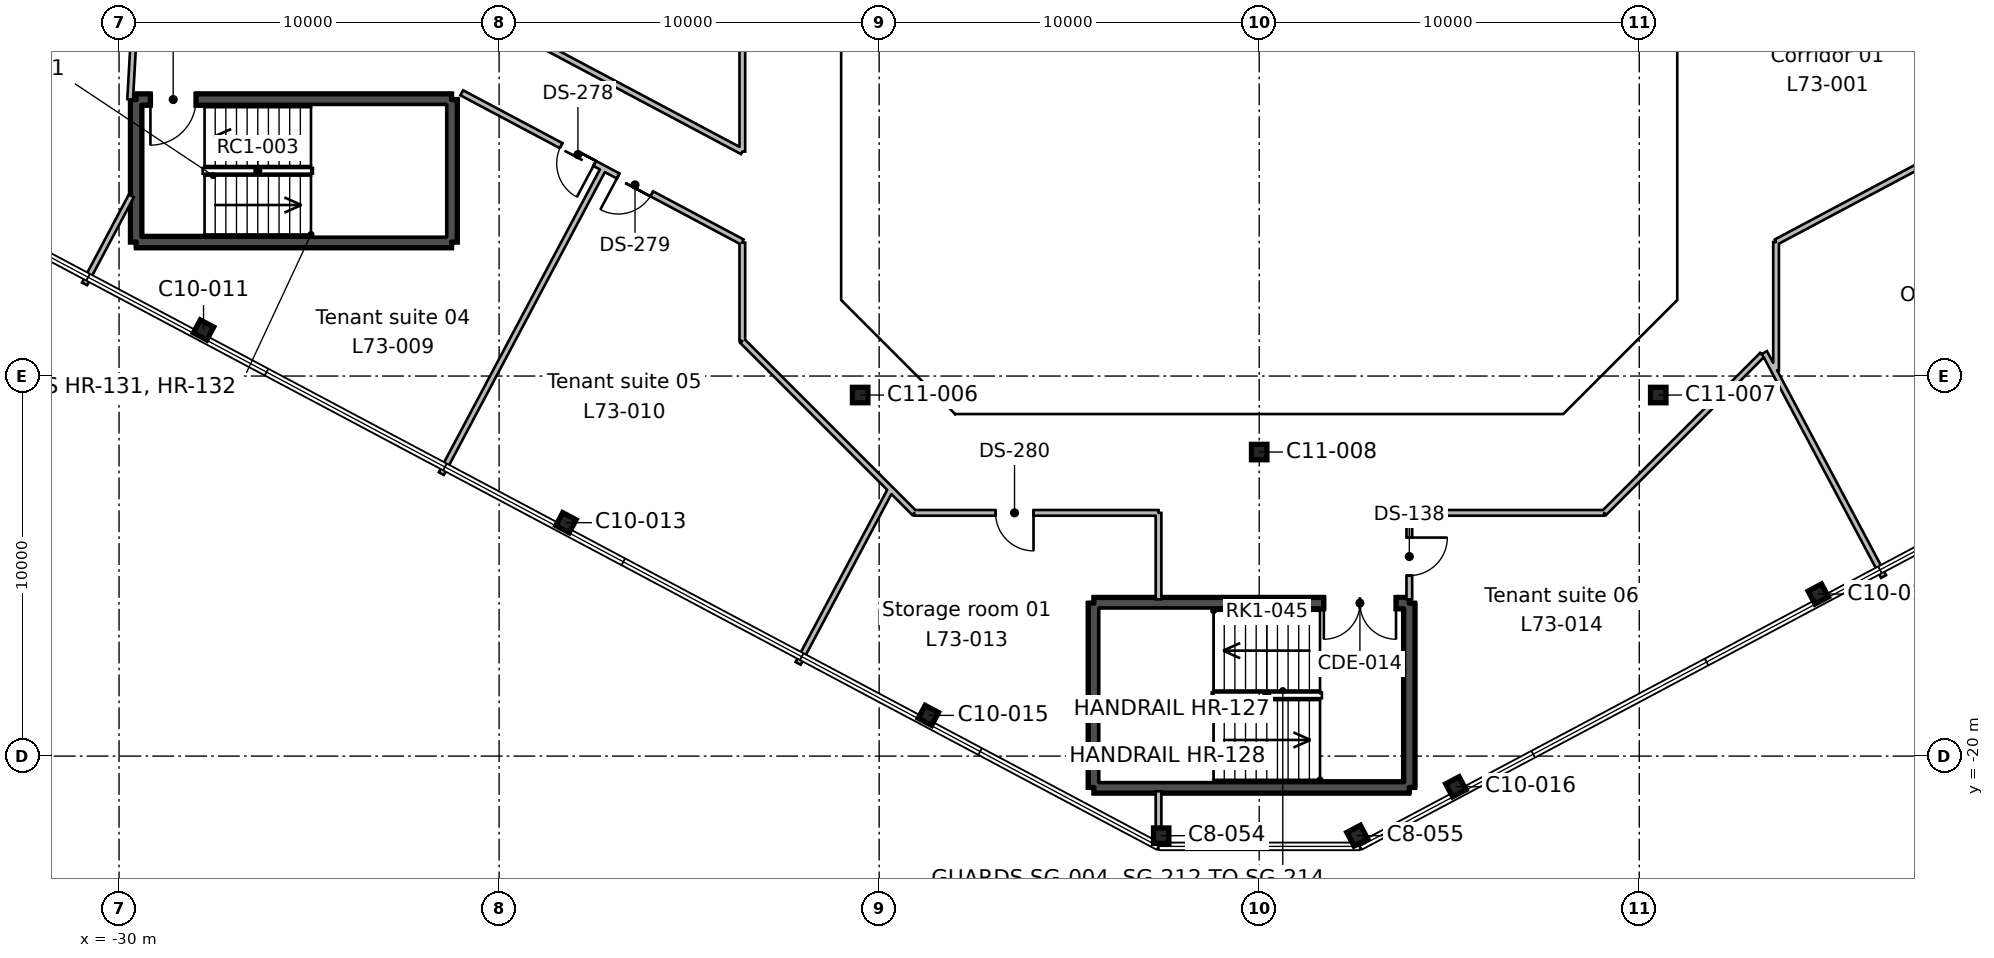
"""IFC4 building model, lengths in metres.
Left out: names, types, materials, properties, quantities, classifications, styles, units other than length and angle.
Written with IfcOpenShell. Run it as: python <this file> out.ifc"""

import sys

from ifc_helpers import new_model, si_unit, direction, frame, frame_2d, origin, origin_2d, place, context, subcontext, project, spatial, rectangle, hollow_rectangle, i_section, extrude, element, fill, save


model = new_model("IFC4")
c1 = context("Model", 3, precision=1e-05, world=origin(), true_north=direction((0.0, 1.0)))
c2 = subcontext(c1, "Body", "Model", "MODEL_VIEW")
j1 = project(units=[si_unit("LENGTHUNIT", "METRE"), si_unit("PLANEANGLEUNIT", "RADIAN")], contexts=[c1])
p1 = place(None, origin())
s1 = spatial("IfcSite", under=j1, at=p1, CompositionType="ELEMENT")
p2 = place(p1, origin())
s2 = spatial("IfcBuilding", under=s1, at=p2, CompositionType="ELEMENT")
p3 = place(p2, frame((0.0, 0.0, 320.4)))
s3 = spatial("IfcBuildingStorey", under=s2, at=p3, CompositionType="ELEMENT", Elevation=320.4)
for number, where, z_axis, x_axis in (
    (1, (-2.579, -22.094, 0.0), (0.0, 0.0, 1.0), (1.0, 0.0, 0.0)),
    (2, (2.579, -22.094, 0.0), (0.0, 0.0, 1.0), (0.883, 0.469, 0.0)),
):
    element("IfcColumn", number, at=place(p3, frame(where, z_axis=z_axis, x_axis=x_axis)), inside=s3, PredefinedType="COLUMN", context=c2, shape_type="SweptSolid", body=[
        extrude(i_section(OverallWidth=0.404, OverallDepth=0.406, WebThickness=0.027, FlangeThickness=0.044, FilletRadius=0.015, at=origin_2d()), origin(), (0.0, 0.0, 1.0), 3.9),
    ])
for number, where, z_axis, x_axis in (
    (3, (5.174, -20.807, 0.0), (0.0, 0.0, 1.0), (0.883, 0.469, 0.0)),
    (4, (-8.705, -18.929, 0.0), (0.0, 0.0, 1.0), (0.883, -0.469, 0.0)),
    (5, (14.71, -15.736, 0.0), (0.0, 0.0, 1.0), (0.883, 0.469, 0.0)),
    (6, (-18.241, -13.858, 0.0), (0.0, 0.0, 1.0), (0.883, -0.469, 0.0)),
):
    element("IfcColumn", number, at=place(p3, frame(where, z_axis=z_axis, x_axis=x_axis)), inside=s3, PredefinedType="COLUMN", context=c2, shape_type="SweptSolid", body=[
        extrude(i_section(OverallWidth=0.399, OverallDepth=0.386, WebThickness=0.021, FlangeThickness=0.033, FilletRadius=0.015, at=origin_2d()), origin(), (0.0, 0.0, 1.0), 3.9),
    ])
for number, where, z_axis, x_axis in (
    (7, (0.0, -12.0, 0.0), (0.0, 0.0, 1.0), (1.0, 0.0, 0.0)),
    (8, (-10.5, -10.5, 0.0), (0.0, 0.0, 1.0), (1.0, 0.0, 0.0)),
    (9, (10.5, -10.5, 0.0), (0.0, 0.0, 1.0), (1.0, 0.0, 0.0)),
):
    element("IfcColumn", number, at=place(p3, frame(where, z_axis=z_axis, x_axis=x_axis)), inside=s3, PredefinedType="COLUMN", context=c2, shape_type="SweptSolid", body=[
        extrude(hollow_rectangle(XDim=0.406, YDim=0.406, WallThickness=0.009, InnerFilletRadius=0.004, OuterFilletRadius=0.013, at=origin_2d()), origin(), (0.0, 0.0, 1.0), 3.9),
    ])
p4 = place(p3, frame((-27.777, -8.788, 0.0), z_axis=(0.0, 0.0, 1.0), x_axis=(0.882947592859, -0.469471562786, 0.0)))
e10 = element("IfcColumn", 10, at=p4, inside=s3, PredefinedType="COLUMN", context=c2, shape_type="SweptSolid", body=[
    extrude(i_section(OverallWidth=0.399, OverallDepth=0.386, WebThickness=0.021, FlangeThickness=0.033, FilletRadius=0.015, at=origin_2d()), origin(), (0.0, 0.0, 1.0), 3.9),
])
p5 = place(p3, frame((3.95, -15.975, 0.0), z_axis=(0.0, 0.0, 1.0), x_axis=(0.0, -1.0, 0.0)))
e11 = element("IfcWall", 11, at=p5, inside=s3, PredefinedType="SHEAR", context=c2, shape_type="SweptSolid", body=[
    extrude(rectangle(XDim=4.85, YDim=0.3, at=frame_2d((2.425, 0.0))), origin(), (0.0, 0.0, 1.0), 3.9),
])
p6 = place(p3, frame((3.95, -20.825, 0.0), z_axis=(0.0, 0.0, 1.0), x_axis=(-1.0, 0.0, 0.0)))
e12 = element("IfcWall", 12, at=p6, inside=s3, PredefinedType="SHEAR", context=c2, shape_type="SweptSolid", body=[
    extrude(rectangle(XDim=8.3, YDim=0.3, at=frame_2d((4.15, 0.0))), origin(), (0.0, 0.0, 1.0), 3.9),
])
p7 = place(p3, frame((-4.35, -20.825, 0.0), z_axis=(0.0, 0.0, 1.0), x_axis=(0.0, 1.0, 0.0)))
e13 = element("IfcWall", 13, at=p7, inside=s3, PredefinedType="SHEAR", context=c2, shape_type="SweptSolid", body=[
    extrude(rectangle(XDim=4.85, YDim=0.3, at=frame_2d((2.425, 0.0))), origin(), (0.0, 0.0, 1.0), 3.9),
])
p8 = place(p3, frame((-4.35, -15.975, 0.0), z_axis=(0.0, 0.0, 1.0), x_axis=(1.0, 0.0, 0.0)))
e14 = element("IfcWall", 14, at=p8, inside=s3, PredefinedType="SHEAR", context=c2, shape_type="SweptSolid", body=[
    extrude(rectangle(XDim=8.3, YDim=0.3, at=frame_2d((4.15, 0.0))), origin(), (0.0, 0.0, 1.0), 3.9),
])
p9 = place(p8, frame((6.05, 0.0, 0.0)))
e15 = element("IfcOpeningElement", 15, at=p9, cuts=e14, PredefinedType="OPENING", context=c2, shape_type="SweptSolid", body=[
    extrude(rectangle(XDim=1.9, YDim=2.1, at=frame_2d((0.95, 1.05))), frame((0.0, 0.16, 0.0), z_axis=(0.0, -1.0, 0.0), x_axis=(1.0, 0.0, 0.0)), (0.0, 0.0, 1.0), 0.32),
])
p10 = place(p3, frame((-21.25, -2.725, 0.0), z_axis=(0.0, 0.0, 1.0), x_axis=(0.0, -1.0, 0.0)))
e16 = element("IfcWall", 16, at=p10, inside=s3, PredefinedType="SHEAR", context=c2, shape_type="SweptSolid", body=[
    extrude(rectangle(XDim=3.75, YDim=0.3, at=frame_2d((1.875, 0.0))), origin(), (0.0, 0.0, 1.0), 3.9),
])
p11 = place(p3, frame((-21.25, -6.475, 0.0), z_axis=(0.0, 0.0, 1.0), x_axis=(-1.0, 0.0, 0.0)))
e17 = element("IfcWall", 17, at=p11, inside=s3, PredefinedType="SHEAR", context=c2, shape_type="SweptSolid", body=[
    extrude(rectangle(XDim=8.3, YDim=0.3, at=frame_2d((4.15, 0.0))), origin(), (0.0, 0.0, 1.0), 3.9),
])
p12 = place(p3, frame((-29.55, -6.475, 0.0), z_axis=(0.0, 0.0, 1.0), x_axis=(0.0, 1.0, 0.0)))
e18 = element("IfcWall", 18, at=p12, inside=s3, PredefinedType="SHEAR", context=c2, shape_type="SweptSolid", body=[
    extrude(rectangle(XDim=3.75, YDim=0.3, at=frame_2d((1.875, 0.0))), origin(), (0.0, 0.0, 1.0), 3.9),
])
p13 = place(p3, frame((-29.55, -2.725, 0.0), z_axis=(0.0, 0.0, 1.0), x_axis=(1.0, 0.0, 0.0)))
e19 = element("IfcWall", 19, at=p13, inside=s3, PredefinedType="SHEAR", context=c2, shape_type="SweptSolid", body=[
    extrude(rectangle(XDim=8.3, YDim=0.3, at=frame_2d((4.15, 0.0))), origin(), (0.0, 0.0, 1.0), 3.9),
])
p14 = place(p13, frame((0.375, 0.0, 0.0)))
e20 = element("IfcOpeningElement", 20, at=p14, cuts=e19, PredefinedType="OPENING", context=c2, shape_type="SweptSolid", body=[
    extrude(rectangle(XDim=1.2, YDim=2.1, at=frame_2d((0.6, 1.05))), frame((0.0, 0.16, 0.0), z_axis=(0.0, -1.0, 0.0), x_axis=(1.0, 0.0, 0.0)), (0.0, 0.0, 1.0), 0.32),
])
p15 = place(p3, frame((-29.677, -5.259, 0.0), z_axis=(0.0, 0.0, 1.0), x_axis=(-0.469186976584, -0.883098851207, 0.0)))
e21 = element("IfcWall", 21, at=p15, inside=s3, PredefinedType="PARTITIONING", context=c2, shape_type="SweptSolid", body=[
    extrude(rectangle(XDim=2.624, YDim=0.15, at=frame_2d((1.312, 0.0))), origin(), (0.0, 0.0, 1.0), 3.54),
])
p16 = place(p3, frame((-29.708, -2.721, 0.0), z_axis=(0.0, 0.0, 1.0), x_axis=(0.056209208886, 0.998419012658, 0.0)))
e22 = element("IfcWall", 22, at=p16, inside=s3, PredefinedType="PARTITIONING", context=c2, shape_type="SweptSolid", body=[
    extrude(rectangle(XDim=4.152, YDim=0.15, at=frame_2d((2.076, 0.0))), origin(), (0.0, 0.0, 1.0), 3.54),
])
p17 = place(p3, frame((-17.248, -4.533, 0.0), z_axis=(0.0, 0.0, 1.0), x_axis=(-0.46943766298, -0.882965616871, 0.0)))
e23 = element("IfcWall", 23, at=p17, inside=s3, PredefinedType="PARTITIONING", context=c2, shape_type="SweptSolid", body=[
    extrude(rectangle(XDim=9.1, YDim=0.15, at=frame_2d((4.55, 0.0))), origin(), (0.0, 0.0, 1.0), 3.54),
])
p18 = place(p3, frame((-13.6, -6.473, 0.0), z_axis=(0.0, 0.0, 1.0), x_axis=(-0.882934197132, 0.469496755618, 0.0)))
e24 = element("IfcWall", 24, at=p18, inside=s3, PredefinedType="PARTITIONING", context=c2, shape_type="SweptSolid", body=[
    extrude(rectangle(XDim=8.362, YDim=0.15, at=frame_2d((4.181, 0.0))), origin(), (0.0, 0.0, 1.0), 3.54),
])
p19 = place(p18, frame((4.4, 0.0, 0.0)))
e25 = element("IfcOpeningElement", 25, at=p19, cuts=e24, PredefinedType="OPENING", context=c2, shape_type="SweptSolid", body=[
    extrude(rectangle(XDim=1.0, YDim=2.1, at=frame_2d((0.5, 1.05))), frame((0.0, 0.085, 0.0), z_axis=(0.0, -1.0, 0.0), x_axis=(1.0, 0.0, 0.0)), (0.0, 0.0, 1.0), 0.17),
])
p20 = place(p18, frame((2.699, 0.0, 0.0)))
e26 = element("IfcOpeningElement", 26, at=p20, cuts=e24, PredefinedType="OPENING", context=c2, shape_type="SweptSolid", body=[
    extrude(rectangle(XDim=1.0, YDim=2.1, at=frame_2d((0.5, 1.05))), frame((0.0, 0.085, 0.0), z_axis=(0.0, -1.0, 0.0), x_axis=(1.0, 0.0, 0.0)), (0.0, 0.0, 1.0), 0.17),
])
p21 = place(p3, frame((-9.661, -13.016, 0.0), z_axis=(0.0, 0.0, 1.0), x_axis=(-0.707106781187, 0.707106781187, 0.0)))
e27 = element("IfcWall", 27, at=p21, inside=s3, PredefinedType="PARTITIONING", context=c2, shape_type="SweptSolid", body=[
    extrude(rectangle(XDim=5.571, YDim=0.15, at=frame_2d((2.785, 0.0))), origin(), (0.0, 0.0, 1.0), 3.54),
])
p22 = place(p3, frame((-13.6, -9.077, 0.0), z_axis=(0.0, 0.0, 1.0), x_axis=(0.0, 1.0, 0.0)))
e28 = element("IfcWall", 28, at=p22, inside=s3, PredefinedType="PARTITIONING", context=c2, shape_type="SweptSolid", body=[
    extrude(rectangle(XDim=2.586, YDim=0.15, at=frame_2d((1.293, 0.0))), origin(), (0.0, 0.0, 1.0), 3.54),
])
p23 = place(p3, frame((-9.696, -12.981, 0.0), z_axis=(0.0, 0.0, 1.0), x_axis=(-0.469664493403, -0.882844982789, 0.0)))
e29 = element("IfcWall", 29, at=p23, inside=s3, PredefinedType="PARTITIONING", context=c2, shape_type="SweptSolid", body=[
    extrude(rectangle(XDim=5.187, YDim=0.15, at=frame_2d((2.593, 0.0))), origin(), (0.0, 0.0, 1.0), 3.54),
])
p24 = place(p3, frame((-3.888, -13.6, 0.0), z_axis=(0.0, 0.0, 1.0), x_axis=(-1.0, 0.0, 0.0)))
e30 = element("IfcWall", 30, at=p24, inside=s3, PredefinedType="PARTITIONING", context=c2, shape_type="SweptSolid", body=[
    extrude(rectangle(XDim=5.189, YDim=0.15, at=frame_2d((2.594, 0.0))), origin(), (0.0, 0.0, 1.0), 3.54),
])
p25 = place(p24, frame((2.05, 0.0, 0.0)))
e31 = element("IfcOpeningElement", 31, at=p25, cuts=e30, PredefinedType="OPENING", context=c2, shape_type="SweptSolid", body=[
    extrude(rectangle(XDim=1.0, YDim=2.1, at=frame_2d((0.5, 1.05))), frame((0.0, 0.085, 0.0), z_axis=(0.0, -1.0, 0.0), x_axis=(1.0, 0.0, 0.0)), (0.0, 0.0, 1.0), 0.17),
])
p26 = place(p3, frame((-9.077, -13.6, 0.0), z_axis=(0.0, 0.0, 1.0), x_axis=(-0.707106781187, 0.707106781187, 0.0)))
e32 = element("IfcWall", 32, at=p26, inside=s3, PredefinedType="PARTITIONING", context=c2, shape_type="SweptSolid", body=[
    extrude(rectangle(XDim=0.871, YDim=0.15, at=frame_2d((0.436, 0.0))), origin(), (0.0, 0.0, 1.0), 3.54),
])
p27 = place(p3, frame((-2.649, -15.875, 0.0), z_axis=(0.0, 0.0, 1.0), x_axis=(0.0, 1.0, 0.0)))
e33 = element("IfcWall", 33, at=p27, inside=s3, PredefinedType="PARTITIONING", context=c2, shape_type="SweptSolid", body=[
    extrude(rectangle(XDim=2.275, YDim=0.15, at=frame_2d((1.137, 0.0))), origin(), (0.0, 0.0, 1.0), 3.54),
])
p28 = place(p3, frame((-2.649, -13.6, 0.0), z_axis=(0.0, 0.0, 1.0), x_axis=(-1.0, 0.0, 0.0)))
e34 = element("IfcWall", 34, at=p28, inside=s3, PredefinedType="PARTITIONING", context=c2, shape_type="SweptSolid", body=[
    extrude(rectangle(XDim=1.239, YDim=0.15, at=frame_2d((0.62, 0.0))), origin(), (0.0, 0.0, 1.0), 3.54),
])
p29 = place(p3, frame((-2.649, -20.925, 0.0), z_axis=(0.0, 0.0, 1.0), x_axis=(0.0, -1.0, 0.0)))
e35 = element("IfcWall", 35, at=p29, inside=s3, PredefinedType="PARTITIONING", context=c2, shape_type="SweptSolid", body=[
    extrude(rectangle(XDim=0.966, YDim=0.15, at=frame_2d((0.483, 0.0))), origin(), (0.0, 0.0, 1.0), 3.54),
])
p30 = place(p3, frame((3.95, -13.6, 0.0), z_axis=(0.0, 0.0, 1.0), x_axis=(0.0, -1.0, 0.0)))
e36 = element("IfcWall", 36, at=p30, inside=s3, PredefinedType="PARTITIONING", context=c2, shape_type="SweptSolid", body=[
    extrude(rectangle(XDim=2.275, YDim=0.15, at=frame_2d((1.137, 0.0))), origin(), (0.0, 0.0, 1.0), 3.54),
])
p31 = place(p30, frame((0.65, 0.0, 0.0)))
e37 = element("IfcOpeningElement", 37, at=p31, cuts=e36, PredefinedType="OPENING", context=c2, shape_type="SweptSolid", body=[
    extrude(rectangle(XDim=1.0, YDim=2.1, at=frame_2d((0.5, 1.05))), frame((0.0, 0.085, 0.0), z_axis=(0.0, -1.0, 0.0), x_axis=(1.0, 0.0, 0.0)), (0.0, 0.0, 1.0), 0.17),
])
p32 = place(p3, frame((13.233, -9.444, 0.0), z_axis=(0.0, 0.0, 1.0), x_axis=(-0.707106781187, -0.707106781187, 0.0)))
e38 = element("IfcWall", 38, at=p32, inside=s3, PredefinedType="PARTITIONING", context=c2, shape_type="SweptSolid", body=[
    extrude(rectangle(XDim=5.877, YDim=0.15, at=frame_2d((2.939, 0.0))), origin(), (0.0, 0.0, 1.0), 3.54),
])
p33 = place(p3, frame((9.077, -13.6, 0.0), z_axis=(0.0, 0.0, 1.0), x_axis=(-1.0, 0.0, 0.0)))
e39 = element("IfcWall", 39, at=p33, inside=s3, PredefinedType="PARTITIONING", context=c2, shape_type="SweptSolid", body=[
    extrude(rectangle(XDim=5.052, YDim=0.15, at=frame_2d((2.526, 0.0))), origin(), (0.0, 0.0, 1.0), 3.54),
])
p34 = place(p3, frame((13.295, -9.382, 0.0), z_axis=(0.0, 0.0, 1.0), x_axis=(0.469560801687, -0.882900137908, 0.0)))
e40 = element("IfcWall", 40, at=p34, inside=s3, PredefinedType="PARTITIONING", context=c2, shape_type="SweptSolid", body=[
    extrude(rectangle(XDim=6.674, YDim=0.15, at=frame_2d((3.337, 0.0))), origin(), (0.0, 0.0, 1.0), 3.54),
])
p35 = place(p3, frame((13.6, -6.473, 0.0), z_axis=(0.0, 0.0, 1.0), x_axis=(0.0, -1.0, 0.0)))
e41 = element("IfcWall", 41, at=p35, inside=s3, PredefinedType="PARTITIONING", context=c2, shape_type="SweptSolid", body=[
    extrude(rectangle(XDim=3.373, YDim=0.15, at=frame_2d((1.687, 0.0))), origin(), (0.0, 0.0, 1.0), 3.54),
])
p36 = place(p3, frame((13.6, -6.473, 0.0), z_axis=(0.0, 0.0, 1.0), x_axis=(0.882936434037, 0.469492548877, 0.0)))
e42 = element("IfcWall", 42, at=p36, inside=s3, PredefinedType="PARTITIONING", context=c2, shape_type="SweptSolid", body=[
    extrude(rectangle(XDim=19.031, YDim=0.15, at=frame_2d((9.515, 0.0))), origin(), (0.0, 0.0, 1.0), 3.54),
])
p37 = place(p36, frame((8.65, 0.0, 0.0)))
e43 = element("IfcOpeningElement", 43, at=p37, cuts=e42, PredefinedType="OPENING", context=c2, shape_type="SweptSolid", body=[
    extrude(rectangle(XDim=1.8, YDim=2.1, at=frame_2d((0.9, 1.05))), frame((0.0, 0.085, 0.0), z_axis=(0.0, -1.0, 0.0), x_axis=(1.0, 0.0, 0.0)), (0.0, 0.0, 1.0), 0.17),
])
p38 = place(p3, frame((-13.6, 9.077, 0.0), z_axis=(0.0, 0.0, 1.0), x_axis=(0.0, -1.0, 0.0)))
e44 = element("IfcWall", 44, at=p38, inside=s3, PredefinedType="PARTITIONING", context=c2, shape_type="SweptSolid", body=[
    extrude(rectangle(XDim=13.171, YDim=0.15, at=frame_2d((6.585, 0.0))), origin(), (0.0, 0.0, 1.0), 3.54),
])
p39 = place(p3, frame((-13.6, -4.094, 0.0), z_axis=(0.0, 0.0, 1.0), x_axis=(-0.882967890474, 0.469433386533, 0.0)))
e45 = element("IfcWall", 45, at=p39, inside=s3, PredefinedType="PARTITIONING", context=c2, shape_type="SweptSolid", body=[
    extrude(rectangle(XDim=7.914, YDim=0.15, at=frame_2d((3.957, 0.0))), origin(), (0.0, 0.0, 1.0), 3.54),
])
p40 = place(p9, frame((1.9, 0.0, 0.0), z_axis=(0.0, 0.0, 1.0), x_axis=(-1.0, 0.0, 0.0)))
e46 = element("IfcDoor", 46, at=p40, inside=s3, OperationType="DOUBLE_DOOR_SINGLE_SWING", PredefinedType="DOOR", context=c2, shape_type="SweptSolid", body=[
    extrude(rectangle(XDim=1.9, YDim=2.1, at=frame_2d((0.95, 1.05))), frame((0.0, 0.025, 0.0), z_axis=(0.0, -1.0, 0.0), x_axis=(1.0, 0.0, 0.0)), (0.0, 0.0, 1.0), 0.05),
])
fill(e15, e46)
p41 = place(p14, frame((1.2, 0.0, 0.0), z_axis=(0.0, 0.0, 1.0), x_axis=(-1.0, 0.0, 0.0)))
e47 = element("IfcDoor", 47, at=p41, inside=s3, OperationType="SINGLE_SWING_RIGHT", PredefinedType="DOOR", context=c2, shape_type="SweptSolid", body=[
    extrude(rectangle(XDim=1.2, YDim=2.1, at=frame_2d((0.6, 1.05))), frame((0.0, 0.025, 0.0), z_axis=(0.0, -1.0, 0.0), x_axis=(1.0, 0.0, 0.0)), (0.0, 0.0, 1.0), 0.05),
])
fill(e20, e47)
p42 = place(p31, origin())
e48 = element("IfcDoor", 48, at=p42, inside=s3, OperationType="SINGLE_SWING_LEFT", PredefinedType="DOOR", context=c2, shape_type="SweptSolid", body=[
    extrude(rectangle(XDim=1.0, YDim=2.1, at=frame_2d((0.5, 1.05))), frame((0.0, 0.025, 0.0), z_axis=(0.0, -1.0, 0.0), x_axis=(1.0, 0.0, 0.0)), (0.0, 0.0, 1.0), 0.05),
])
fill(e37, e48)
p43 = place(p19, origin())
e49 = element("IfcDoor", 49, at=p43, inside=s3, OperationType="SINGLE_SWING_LEFT", PredefinedType="DOOR", context=c2, shape_type="SweptSolid", body=[
    extrude(rectangle(XDim=1.0, YDim=2.1, at=frame_2d((0.5, 1.05))), frame((0.0, 0.025, 0.0), z_axis=(0.0, -1.0, 0.0), x_axis=(1.0, 0.0, 0.0)), (0.0, 0.0, 1.0), 0.05),
])
fill(e25, e49)
p44 = place(p20, origin())
e50 = element("IfcDoor", 50, at=p44, inside=s3, OperationType="SINGLE_SWING_RIGHT", PredefinedType="DOOR", context=c2, shape_type="SweptSolid", body=[
    extrude(rectangle(XDim=1.0, YDim=2.1, at=frame_2d((0.5, 1.05))), frame((0.0, 0.025, 0.0), z_axis=(0.0, -1.0, 0.0), x_axis=(1.0, 0.0, 0.0)), (0.0, 0.0, 1.0), 0.05),
])
fill(e26, e50)
p45 = place(p25, origin())
e51 = element("IfcDoor", 51, at=p45, inside=s3, OperationType="SINGLE_SWING_LEFT", PredefinedType="DOOR", context=c2, shape_type="SweptSolid", body=[
    extrude(rectangle(XDim=1.0, YDim=2.1, at=frame_2d((0.5, 1.05))), frame((0.0, 0.025, 0.0), z_axis=(0.0, -1.0, 0.0), x_axis=(1.0, 0.0, 0.0)), (0.0, 0.0, 1.0), 0.05),
])
fill(e31, e51)
save(model, sys.argv[1])
